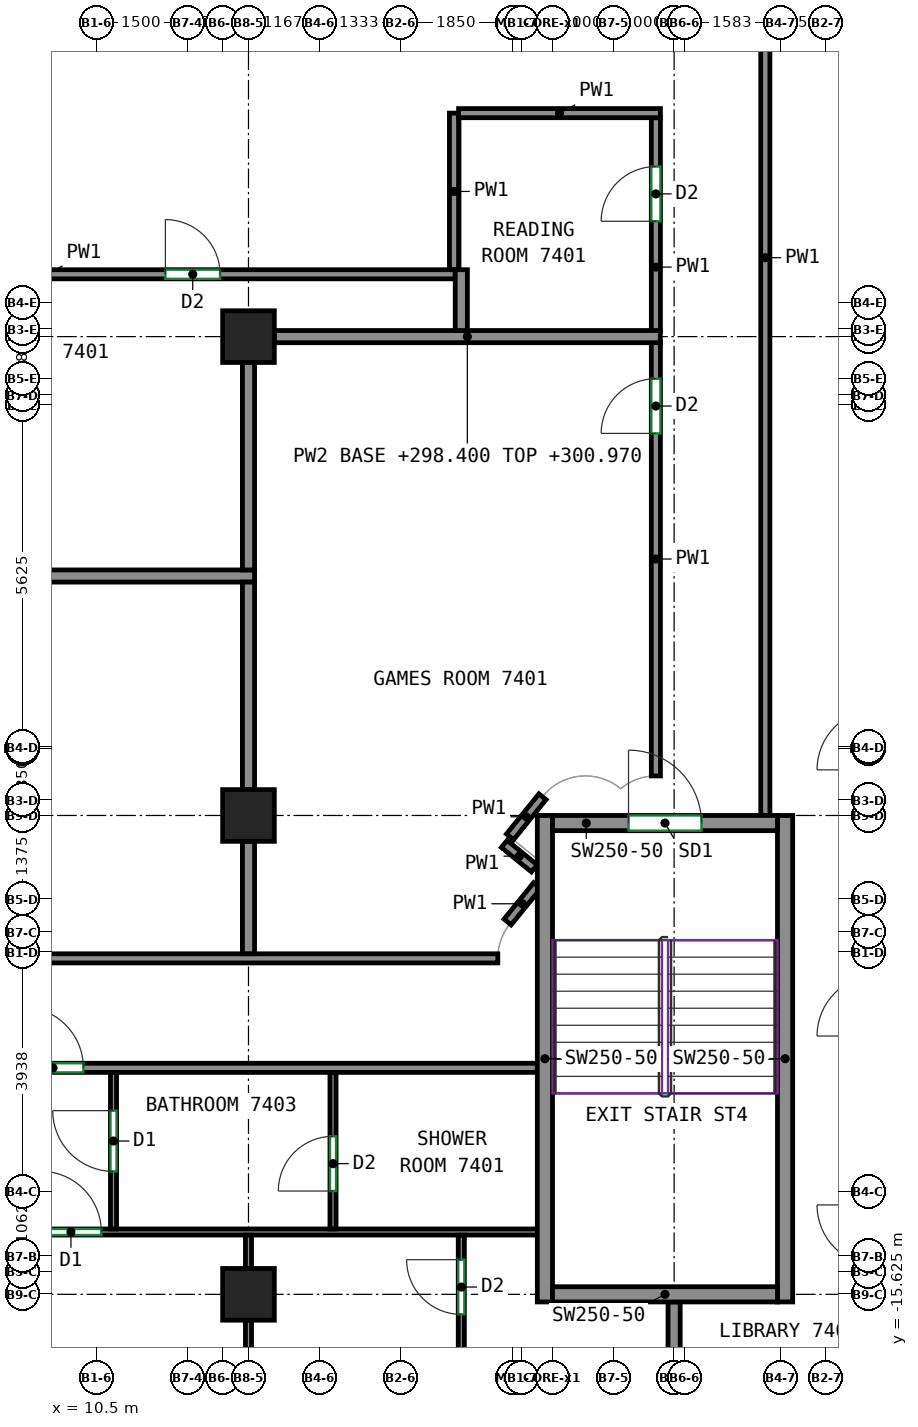
"""IFC4 building model, lengths in metres.
Left out: names, types, materials, properties, quantities, classifications, styles, units other than length and angle.
Written with IfcOpenShell. Run it as: python <this file> out.ifc"""

import sys

from ifc_helpers import new_model, si_unit, direction, frame, frame_2d, origin, origin_2d, place, context, subcontext, project, spatial, rectangle, extrude, source, transform, mapped, element, fill, save


model = new_model("IFC4")
c1 = context("Model", 3, precision=1e-05, world=origin(), true_north=direction((0.0, 1.0)))
c2 = subcontext(c1, "Body", "Model", "MODEL_VIEW")
j1 = project(units=[si_unit("LENGTHUNIT", "METRE"), si_unit("PLANEANGLEUNIT", "RADIAN")], contexts=[c1])
p1 = place(None, origin())
s1 = spatial("IfcSite", under=j1, at=p1, CompositionType="ELEMENT")
p2 = place(p1, origin())
s2 = spatial("IfcBuilding", under=s1, at=p2, CompositionType="ELEMENT")
p3 = place(p2, frame((0.0, 0.0, 298.4)))
s3 = spatial("IfcBuildingStorey", under=s2, at=p3, CompositionType="ELEMENT", Elevation=298.4)
m1 = source(origin(), c2, "Body", "SweptSolid", [
    extrude(rectangle(XDim=0.85, YDim=0.85, at=origin_2d()), origin(), (0.0, 0.0, 1.0), 3.12),
])
for number, where, z_axis, x_axis in (
    (1, (13.0, -15.625, 0.0), (0.0, 0.0, 1.0), (1.0, 0.0, 0.0)),
    (2, (13.0, -7.75, 0.0), (0.0, 0.0, 1.0), (1.0, 0.0, 0.0)),
    (3, (13.0, 0.125, 0.0), (0.0, 0.0, 1.0), (1.0, 0.0, 0.0)),
):
    element("IfcColumn", number, at=place(p3, frame(where, z_axis=z_axis, x_axis=x_axis)), inside=s3, PredefinedType="COLUMN", context=c2, shape_type="MappedRepresentation", body=[
        mapped(m1, transform((0.0, 0.0, 0.0))),
    ])
m2 = source(origin(), c2, "Body", "SweptSolid", [
    extrude(rectangle(XDim=8.0, YDim=0.25, at=frame_2d((4.0, 0.0))), origin(), (0.0, 0.0, 1.0), 3.12),
])
for number, where, z_axis, x_axis in (
    (4, (17.875, -15.75, 0.0), (0.0, 0.0, 1.0), (0.0, 1.0, 0.0)),
    (5, (21.825, -15.75, 0.0), (0.0, 0.0, 1.0), (0.0, 1.0, 0.0)),
):
    element("IfcWall", number, at=place(p3, frame(where, z_axis=z_axis, x_axis=x_axis)), inside=s3, PredefinedType="SHEAR", context=c2, shape_type="MappedRepresentation", body=[
        mapped(m2, transform((0.0, 0.0, 0.0))),
    ])
m3 = source(origin(), c2, "Body", "SweptSolid", [
    extrude(rectangle(XDim=3.7, YDim=0.25, at=frame_2d((1.85, 0.0))), origin(), (0.0, 0.0, 1.0), 3.12),
])
p4 = place(p3, frame((18.0, -15.625, 0.0), z_axis=(0.0, 0.0, 1.0), x_axis=(1.0, 0.0, 0.0)))
e6 = element("IfcWall", 6, at=p4, inside=s3, PredefinedType="SHEAR", context=c2, shape_type="MappedRepresentation", body=[
    mapped(m3, transform((0.0, 0.0, 0.0))),
])
p5 = place(p3, frame((18.0, -7.875, 0.0), z_axis=(0.0, 0.0, 1.0), x_axis=(1.0, 0.0, 0.0)))
e7 = element("IfcWall", 7, at=p5, inside=s3, PredefinedType="SHEAR", context=c2, shape_type="MappedRepresentation", body=[
    mapped(m3, transform((0.0, 0.0, 0.0))),
])
p6 = place(p5, frame((1.25, 0.0, 0.0)))
e8 = element("IfcOpeningElement", 8, at=p6, cuts=e7, PredefinedType="OPENING", context=c2, shape_type="SweptSolid", body=[
    extrude(rectangle(XDim=1.2, YDim=2.1, at=frame_2d((0.6, 1.05))), frame((0.0, 0.135, 0.0), z_axis=(0.0, -1.0, 0.0), x_axis=(1.0, 0.0, 0.0)), (0.0, 0.0, 1.0), 0.27),
])
p7 = place(p3, frame((-13.55, -11.9, 0.0), z_axis=(0.0, 0.0, 1.0), x_axis=(1.0, 0.0, 0.0)))
e9 = element("IfcWall", 9, at=p7, inside=s3, PredefinedType="PARTITIONING", context=c2, shape_type="SweptSolid", body=[
    extrude(rectangle(XDim=31.3, YDim=0.15, at=frame_2d((15.65, 0.0))), origin(), (0.0, 0.0, 1.0), 3.12),
])
p8 = place(p7, frame((3.747, 0.0, 0.0)))
e10 = element("IfcOpeningElement", 10, at=p8, cuts=e9, PredefinedType="OPENING", context=c2, shape_type="SweptSolid", body=[
    extrude(rectangle(XDim=1.0, YDim=2.1, at=frame_2d((0.5, 1.05))), frame((0.0, 0.085, 0.0), z_axis=(0.0, -1.0, 0.0), x_axis=(1.0, 0.0, 0.0)), (0.0, 0.0, 1.0), 0.17),
])
p9 = place(p7, frame((22.835, 0.0, 0.0)))
e11 = element("IfcOpeningElement", 11, at=p9, cuts=e9, PredefinedType="OPENING", context=c2, shape_type="SweptSolid", body=[
    extrude(rectangle(XDim=1.0, YDim=2.1, at=frame_2d((0.5, 1.05))), frame((0.0, 0.085, 0.0), z_axis=(0.0, -1.0, 0.0), x_axis=(1.0, 0.0, 0.0)), (0.0, 0.0, 1.0), 0.17),
])
p10 = place(p3, frame((21.5, -7.75, 0.0), z_axis=(0.0, 0.0, 1.0), x_axis=(0.0, 1.0, 0.0)))
e12 = element("IfcWall", 12, at=p10, inside=s3, PredefinedType="PARTITIONING", context=c2, shape_type="SweptSolid", body=[
    extrude(rectangle(XDim=30.575, YDim=0.15, at=frame_2d((15.288, 0.0))), origin(), (0.0, 0.0, 1.0), 3.12),
])
p11 = place(p10, frame((14.035, 0.0, 0.0)))
e13 = element("IfcOpeningElement", 13, at=p11, cuts=e12, PredefinedType="OPENING", context=c2, shape_type="SweptSolid", body=[
    extrude(rectangle(XDim=0.9, YDim=2.1, at=frame_2d((0.45, 1.05))), frame((0.0, 0.085, 0.0), z_axis=(0.0, -1.0, 0.0), x_axis=(1.0, 0.0, 0.0)), (0.0, 0.0, 1.0), 0.17),
])
p12 = place(p3, frame((-13.55, -10.1, 0.0), z_axis=(0.0, 0.0, 1.0), x_axis=(1.0, 0.0, 0.0)))
e14 = element("IfcWall", 14, at=p12, inside=s3, PredefinedType="PARTITIONING", context=c2, shape_type="SweptSolid", body=[
    extrude(rectangle(XDim=30.65, YDim=0.15, at=frame_2d((15.325, 0.0))), origin(), (0.0, 0.0, 1.0), 3.12),
])
p13 = place(p12, frame((10.25, 0.0, 0.0)))
e15 = element("IfcOpeningElement", 15, at=p13, cuts=e14, PredefinedType="OPENING", context=c2, shape_type="SweptSolid", body=[
    extrude(rectangle(XDim=0.9, YDim=2.1, at=frame_2d((0.45, 1.05))), frame((0.0, 0.085, 0.0), z_axis=(0.0, -1.0, 0.0), x_axis=(1.0, 0.0, 0.0)), (0.0, 0.0, 1.0), 0.17),
])
p14 = place(p12, frame((22.153, 0.0, 0.0)))
e16 = element("IfcOpeningElement", 16, at=p14, cuts=e14, PredefinedType="OPENING", context=c2, shape_type="SweptSolid", body=[
    extrude(rectangle(XDim=0.9, YDim=2.1, at=frame_2d((0.45, 1.05))), frame((0.0, 0.085, 0.0), z_axis=(0.0, -1.0, 0.0), x_axis=(1.0, 0.0, 0.0)), (0.0, 0.0, 1.0), 0.17),
])
p15 = place(p3, frame((16.38, 1.225, 0.0), z_axis=(0.0, 0.0, 1.0), x_axis=(0.0, 1.0, 0.0)))
e17 = element("IfcWall", 17, at=p15, inside=s3, PredefinedType="PARTITIONING", context=c2, shape_type="SweptSolid", body=[
    extrude(rectangle(XDim=2.575, YDim=0.15, at=frame_2d((1.288, 0.0))), origin(), (0.0, 0.0, 1.0), 3.12),
])
p16 = place(p3, frame((6.805, 1.15, 0.0), z_axis=(0.0, 0.0, 1.0), x_axis=(1.0, 0.0, 0.0)))
e18 = element("IfcWall", 18, at=p16, inside=s3, PredefinedType="PARTITIONING", context=c2, shape_type="SweptSolid", body=[
    extrude(rectangle(XDim=9.595, YDim=0.15, at=frame_2d((4.797, 0.0))), origin(), (0.0, 0.0, 1.0), 3.12),
])
p17 = place(p16, frame((4.828, 0.0, 0.0)))
e19 = element("IfcOpeningElement", 19, at=p17, cuts=e18, PredefinedType="OPENING", context=c2, shape_type="SweptSolid", body=[
    extrude(rectangle(XDim=0.9, YDim=2.1, at=frame_2d((0.45, 1.05))), frame((0.0, 0.085, 0.0), z_axis=(0.0, -1.0, 0.0), x_axis=(1.0, 0.0, 0.0)), (0.0, 0.0, 1.0), 0.17),
])
p18 = place(p3, frame((17.748, -8.902, 0.0), z_axis=(0.0, 0.0, 1.0), x_axis=(-0.630342797145, -0.776316918589, 0.0)))
e20 = element("IfcWall", 20, at=p18, inside=s3, PredefinedType="PARTITIONING", context=c2, shape_type="SweptSolid", body=[
    extrude(rectangle(XDim=0.773, YDim=0.15, at=frame_2d((0.386, 0.0))), origin(), (0.0, 0.0, 1.0), 3.12),
])
p19 = place(p3, frame((17.206, -8.218, 0.0), z_axis=(0.0, 0.0, 1.0), x_axis=(0.776102288291, -0.630607039376, 0.0)))
e21 = element("IfcWall", 21, at=p19, inside=s3, PredefinedType="PARTITIONING", context=c2, shape_type="SweptSolid", body=[
    extrude(rectangle(XDim=0.638, YDim=0.15, at=frame_2d((0.319, 0.0))), origin(), (0.0, 0.0, 1.0), 3.12),
])
p20 = place(p3, frame((17.835, -7.442, 0.0), z_axis=(0.0, 0.0, 1.0), x_axis=(-0.628859024249, -0.777519342281, 0.0)))
e22 = element("IfcWall", 22, at=p20, inside=s3, PredefinedType="PARTITIONING", context=c2, shape_type="SweptSolid", body=[
    extrude(rectangle(XDim=0.849, YDim=0.15, at=frame_2d((0.425, 0.0))), origin(), (0.0, 0.0, 1.0), 3.12),
])
p21 = place(p3, frame((19.7, -7.1, 0.0), z_axis=(0.0, 0.0, 1.0), x_axis=(0.0, 1.0, 0.0)))
e23 = element("IfcWall", 23, at=p21, inside=s3, PredefinedType="PARTITIONING", context=c2, shape_type="SweptSolid", body=[
    extrude(rectangle(XDim=7.135, YDim=0.15, at=frame_2d((3.567, 0.0))), origin(), (0.0, 0.0, 1.0), 3.12),
])
p22 = place(p21, frame((5.633, 0.0, 0.0)))
e24 = element("IfcOpeningElement", 24, at=p22, cuts=e23, PredefinedType="OPENING", context=c2, shape_type="SweptSolid", body=[
    extrude(rectangle(XDim=0.9, YDim=2.1, at=frame_2d((0.45, 1.05))), frame((0.0, 0.085, 0.0), z_axis=(0.0, -1.0, 0.0), x_axis=(1.0, 0.0, 0.0)), (0.0, 0.0, 1.0), 0.17),
])
p23 = place(p3, frame((19.7, 0.215, 0.0), z_axis=(0.0, 0.0, 1.0), x_axis=(0.0, 1.0, 0.0)))
e25 = element("IfcWall", 25, at=p23, inside=s3, PredefinedType="PARTITIONING", context=c2, shape_type="SweptSolid", body=[
    extrude(rectangle(XDim=3.51, YDim=0.15, at=frame_2d((1.755, 0.0))), origin(), (0.0, 0.0, 1.0), 3.12),
])
p24 = place(p23, frame((1.807, 0.0, 0.0)))
e26 = element("IfcOpeningElement", 26, at=p24, cuts=e25, PredefinedType="OPENING", context=c2, shape_type="SweptSolid", body=[
    extrude(rectangle(XDim=0.9, YDim=2.1, at=frame_2d((0.45, 1.05))), frame((0.0, 0.085, 0.0), z_axis=(0.0, -1.0, 0.0), x_axis=(1.0, 0.0, 0.0)), (0.0, 0.0, 1.0), 0.17),
])
p25 = place(p3, frame((16.455, 3.8, 0.0), z_axis=(0.0, 0.0, 1.0), x_axis=(1.0, 0.0, 0.0)))
e27 = element("IfcWall", 27, at=p25, inside=s3, PredefinedType="PARTITIONING", context=c2, shape_type="SweptSolid", body=[
    extrude(rectangle(XDim=3.32, YDim=0.15, at=frame_2d((1.66, 0.0))), origin(), (0.0, 0.0, 1.0), 3.12),
])
p26 = place(p3, frame((-13.55, -14.6, 0.0), z_axis=(0.0, 0.0, 1.0), x_axis=(1.0, 0.0, 0.0)))
e28 = element("IfcWall", 28, at=p26, inside=s3, PredefinedType="PARTITIONING", context=c2, shape_type="SweptSolid", body=[
    extrude(rectangle(XDim=31.3, YDim=0.1, at=frame_2d((15.65, 0.0))), origin(), (0.0, 0.0, 1.0), 3.12),
])
p27 = place(p26, frame((0.309, 0.0, 0.0)))
e29 = element("IfcOpeningElement", 29, at=p27, cuts=e28, PredefinedType="OPENING", context=c2, shape_type="SweptSolid", body=[
    extrude(rectangle(XDim=0.9, YDim=2.1, at=frame_2d((0.45, 1.05))), frame((0.0, 0.06, 0.0), z_axis=(0.0, -1.0, 0.0), x_axis=(1.0, 0.0, 0.0)), (0.0, 0.0, 1.0), 0.12),
])
p28 = place(p26, frame((4.103, 0.0, 0.0)))
e30 = element("IfcOpeningElement", 30, at=p28, cuts=e28, PredefinedType="OPENING", context=c2, shape_type="SweptSolid", body=[
    extrude(rectangle(XDim=1.0, YDim=2.1, at=frame_2d((0.5, 1.05))), frame((0.0, 0.06, 0.0), z_axis=(0.0, -1.0, 0.0), x_axis=(1.0, 0.0, 0.0)), (0.0, 0.0, 1.0), 0.12),
])
p29 = place(p26, frame((13.955, 0.0, 0.0)))
e31 = element("IfcOpeningElement", 31, at=p29, cuts=e28, PredefinedType="OPENING", context=c2, shape_type="SweptSolid", body=[
    extrude(rectangle(XDim=0.9, YDim=2.1, at=frame_2d((0.45, 1.05))), frame((0.0, 0.06, 0.0), z_axis=(0.0, -1.0, 0.0), x_axis=(1.0, 0.0, 0.0)), (0.0, 0.0, 1.0), 0.12),
])
p30 = place(p26, frame((17.453, 0.0, 0.0)))
e32 = element("IfcOpeningElement", 32, at=p30, cuts=e28, PredefinedType="OPENING", context=c2, shape_type="SweptSolid", body=[
    extrude(rectangle(XDim=1.0, YDim=2.1, at=frame_2d((0.5, 1.05))), frame((0.0, 0.06, 0.0), z_axis=(0.0, -1.0, 0.0), x_axis=(1.0, 0.0, 0.0)), (0.0, 0.0, 1.0), 0.12),
])
p31 = place(p26, frame((23.13, 0.0, 0.0)))
e33 = element("IfcOpeningElement", 33, at=p31, cuts=e28, PredefinedType="OPENING", context=c2, shape_type="SweptSolid", body=[
    extrude(rectangle(XDim=1.0, YDim=2.1, at=frame_2d((0.5, 1.05))), frame((0.0, 0.06, 0.0), z_axis=(0.0, -1.0, 0.0), x_axis=(1.0, 0.0, 0.0)), (0.0, 0.0, 1.0), 0.12),
])
p32 = place(p3, frame((10.78, -14.55, 0.0), z_axis=(0.0, 0.0, 1.0), x_axis=(0.0, 1.0, 0.0)))
e34 = element("IfcWall", 34, at=p32, inside=s3, PredefinedType="PARTITIONING", context=c2, shape_type="SweptSolid", body=[
    extrude(rectangle(XDim=2.573, YDim=0.1, at=frame_2d((1.287, 0.0))), origin(), (0.0, 0.0, 1.0), 3.12),
])
p33 = place(p32, frame((0.946, 0.0, 0.0)))
e35 = element("IfcOpeningElement", 35, at=p33, cuts=e34, PredefinedType="OPENING", context=c2, shape_type="SweptSolid", body=[
    extrude(rectangle(XDim=1.0, YDim=2.1, at=frame_2d((0.5, 1.05))), frame((0.0, 0.06, 0.0), z_axis=(0.0, -1.0, 0.0), x_axis=(1.0, 0.0, 0.0)), (0.0, 0.0, 1.0), 0.12),
])
p34 = place(p3, frame((14.39, -14.55, 0.0), z_axis=(0.0, 0.0, 1.0), x_axis=(0.0, 1.0, 0.0)))
e36 = element("IfcWall", 36, at=p34, inside=s3, PredefinedType="PARTITIONING", context=c2, shape_type="SweptSolid", body=[
    extrude(rectangle(XDim=2.573, YDim=0.1, at=frame_2d((1.287, 0.0))), origin(), (0.0, 0.0, 1.0), 3.12),
])
p35 = place(p34, frame((0.624, 0.0, 0.0)))
e37 = element("IfcOpeningElement", 37, at=p35, cuts=e36, PredefinedType="OPENING", context=c2, shape_type="SweptSolid", body=[
    extrude(rectangle(XDim=0.9, YDim=2.1, at=frame_2d((0.45, 1.05))), frame((0.0, 0.06, 0.0), z_axis=(0.0, -1.0, 0.0), x_axis=(1.0, 0.0, 0.0)), (0.0, 0.0, 1.0), 0.12),
])
p36 = place(p3, frame((13.0, -15.2, 0.0), z_axis=(0.0, 0.0, 1.0), x_axis=(0.0, 1.0, 0.0)))
e38 = element("IfcWall", 38, at=p36, inside=s3, PredefinedType="PARTITIONING", context=c2, shape_type="SweptSolid", body=[
    extrude(rectangle(XDim=0.548, YDim=0.1, at=frame_2d((0.274, 0.0))), origin(), (0.0, 0.0, 1.0), 3.12),
])
p37 = place(p3, frame((13.0, -22.75, 0.0), z_axis=(0.0, 0.0, 1.0), x_axis=(0.0, 1.0, 0.0)))
e39 = element("IfcWall", 39, at=p37, inside=s3, PredefinedType="PARTITIONING", context=c2, shape_type="SweptSolid", body=[
    extrude(rectangle(XDim=6.7, YDim=0.1, at=frame_2d((3.35, 0.0))), origin(), (0.0, 0.0, 1.0), 3.12),
])
p38 = place(p37, frame((4.377, 0.0, 0.0)))
e40 = element("IfcOpeningElement", 40, at=p38, cuts=e39, PredefinedType="OPENING", context=c2, shape_type="SweptSolid", body=[
    extrude(rectangle(XDim=0.9, YDim=2.1, at=frame_2d((0.45, 1.05))), frame((0.0, 0.06, 0.0), z_axis=(0.0, -1.0, 0.0), x_axis=(1.0, 0.0, 0.0)), (0.0, 0.0, 1.0), 0.12),
])
p39 = place(p3, frame((16.5, -19.91, 0.0), z_axis=(0.0, 0.0, 1.0), x_axis=(0.0, 1.0, 0.0)))
e41 = element("IfcWall", 41, at=p39, inside=s3, PredefinedType="PARTITIONING", context=c2, shape_type="SweptSolid", body=[
    extrude(rectangle(XDim=5.258, YDim=0.1, at=frame_2d((2.629, 0.0))), origin(), (0.0, 0.0, 1.0), 3.12),
])
p40 = place(p39, frame((3.955, 0.0, 0.0)))
e42 = element("IfcOpeningElement", 42, at=p40, cuts=e41, PredefinedType="OPENING", context=c2, shape_type="SweptSolid", body=[
    extrude(rectangle(XDim=0.9, YDim=2.1, at=frame_2d((0.45, 1.05))), frame((0.0, 0.06, 0.0), z_axis=(0.0, -1.0, 0.0), x_axis=(1.0, 0.0, 0.0)), (0.0, 0.0, 1.0), 0.12),
])
p41 = place(p3, frame((20.0, -19.9, 0.0), z_axis=(0.0, 0.0, 1.0), x_axis=(0.0, 1.0, 0.0)))
e43 = element("IfcWall", 43, at=p41, inside=s3, PredefinedType="PARTITIONING", context=c2, shape_type="SweptSolid", body=[
    extrude(rectangle(XDim=4.15, YDim=0.2, at=frame_2d((2.075, 0.0))), origin(), (0.0, 0.0, 1.0), 3.12),
])
p42 = place(p3, frame((-4.6, -3.812, 0.0), z_axis=(0.0, 0.0, 1.0), x_axis=(1.0, 0.0, 0.0)))
e44 = element("IfcWall", 44, at=p42, inside=s3, PredefinedType="PARTITIONING", context=c2, shape_type="SweptSolid", body=[
    extrude(rectangle(XDim=17.7, YDim=0.2, at=frame_2d((8.85, 0.0))), origin(), (0.0, 0.0, 1.0), 3.12),
])
p43 = place(p3, frame((13.0, -7.325, 0.0), z_axis=(0.0, 0.0, 1.0), x_axis=(0.0, 1.0, 0.0)))
e45 = element("IfcWall", 45, at=p43, inside=s3, PredefinedType="PARTITIONING", context=c2, shape_type="SweptSolid", body=[
    extrude(rectangle(XDim=3.413, YDim=0.2, at=frame_2d((1.707, 0.0))), origin(), (0.0, 0.0, 1.0), 3.12),
])
p44 = place(p3, frame((13.0, -10.023, 0.0), z_axis=(0.0, 0.0, 1.0), x_axis=(0.0, 1.0, 0.0)))
e46 = element("IfcWall", 46, at=p44, inside=s3, PredefinedType="PARTITIONING", context=c2, shape_type="SweptSolid", body=[
    extrude(rectangle(XDim=1.848, YDim=0.2, at=frame_2d((0.924, 0.0))), origin(), (0.0, 0.0, 1.0), 3.12),
])
p45 = place(p3, frame((13.425, 0.125, 0.0), z_axis=(0.0, 0.0, 1.0), x_axis=(1.0, 0.0, 0.0)))
e47 = element("IfcWall", 47, at=p45, inside=s3, PredefinedType="PARTITIONING", context=c2, shape_type="SweptSolid", body=[
    extrude(rectangle(XDim=6.348, YDim=0.2, at=frame_2d((3.174, 0.0))), origin(), (0.0, 0.0, 1.0), 2.57),
])
p46 = place(p3, frame((13.0, -3.712, 0.0), z_axis=(0.0, 0.0, 1.0), x_axis=(0.0, 1.0, 0.0)))
e48 = element("IfcWall", 48, at=p46, inside=s3, PredefinedType="PARTITIONING", context=c2, shape_type="SweptSolid", body=[
    extrude(rectangle(XDim=3.412, YDim=0.2, at=frame_2d((1.706, 0.0))), origin(), (0.0, 0.0, 1.0), 3.12),
])
p47 = place(p3, frame((16.5, 0.225, 0.0), z_axis=(0.0, 0.0, 1.0), x_axis=(0.0, 1.0, 0.0)))
e49 = element("IfcWall", 49, at=p47, inside=s3, PredefinedType="PARTITIONING", context=c2, shape_type="SweptSolid", body=[
    extrude(rectangle(XDim=1.0, YDim=0.2, at=frame_2d((0.5, 0.0))), origin(), (0.0, 0.0, 1.0), 3.12),
])
p48 = place(p6, origin())
e50 = element("IfcDoor", 50, at=p48, inside=s3, OperationType="DOUBLE_DOOR_SINGLE_SWING", PredefinedType="DOOR", context=c2, shape_type="SweptSolid", body=[
    extrude(rectangle(XDim=1.2, YDim=2.1, at=frame_2d((0.6, 1.05))), frame((0.0, 0.025, 0.0), z_axis=(0.0, -1.0, 0.0), x_axis=(1.0, 0.0, 0.0)), (0.0, 0.0, 1.0), 0.05),
])
fill(e8, e50)
p49 = place(p40, origin())
e51 = element("IfcDoor", 51, at=p49, inside=s3, OperationType="SINGLE_SWING_RIGHT", PredefinedType="DOOR", context=c2, shape_type="SweptSolid", body=[
    extrude(rectangle(XDim=0.9, YDim=2.1, at=frame_2d((0.45, 1.05))), frame((0.0, 0.025, 0.0), z_axis=(0.0, -1.0, 0.0), x_axis=(1.0, 0.0, 0.0)), (0.0, 0.0, 1.0), 0.05),
])
fill(e42, e51)
p50 = place(p31, origin())
e52 = element("IfcDoor", 52, at=p50, inside=s3, OperationType="SINGLE_SWING_LEFT", PredefinedType="DOOR", context=c2, shape_type="SweptSolid", body=[
    extrude(rectangle(XDim=1.0, YDim=2.1, at=frame_2d((0.5, 1.05))), frame((0.0, 0.025, 0.0), z_axis=(0.0, -1.0, 0.0), x_axis=(1.0, 0.0, 0.0)), (0.0, 0.0, 1.0), 0.05),
])
fill(e33, e52)
p51 = place(p35, origin())
e53 = element("IfcDoor", 53, at=p51, inside=s3, OperationType="SINGLE_SWING_LEFT", PredefinedType="DOOR", context=c2, shape_type="SweptSolid", body=[
    extrude(rectangle(XDim=0.9, YDim=2.1, at=frame_2d((0.45, 1.05))), frame((0.0, 0.025, 0.0), z_axis=(0.0, -1.0, 0.0), x_axis=(1.0, 0.0, 0.0)), (0.0, 0.0, 1.0), 0.05),
])
fill(e37, e53)
p52 = place(p33, origin())
e54 = element("IfcDoor", 54, at=p52, inside=s3, OperationType="SINGLE_SWING_RIGHT", PredefinedType="DOOR", context=c2, shape_type="SweptSolid", body=[
    extrude(rectangle(XDim=1.0, YDim=2.1, at=frame_2d((0.5, 1.05))), frame((0.0, 0.025, 0.0), z_axis=(0.0, -1.0, 0.0), x_axis=(1.0, 0.0, 0.0)), (0.0, 0.0, 1.0), 0.05),
])
fill(e35, e54)
p53 = place(p9, origin())
e55 = element("IfcDoor", 55, at=p53, inside=s3, OperationType="SINGLE_SWING_LEFT", PredefinedType="DOOR", context=c2, shape_type="SweptSolid", body=[
    extrude(rectangle(XDim=1.0, YDim=2.1, at=frame_2d((0.5, 1.05))), frame((0.0, 0.025, 0.0), z_axis=(0.0, -1.0, 0.0), x_axis=(1.0, 0.0, 0.0)), (0.0, 0.0, 1.0), 0.05),
])
fill(e11, e55)
p54 = place(p22, origin())
e56 = element("IfcDoor", 56, at=p54, inside=s3, OperationType="SINGLE_SWING_LEFT", PredefinedType="DOOR", context=c2, shape_type="SweptSolid", body=[
    extrude(rectangle(XDim=0.9, YDim=2.1, at=frame_2d((0.45, 1.05))), frame((0.0, 0.025, 0.0), z_axis=(0.0, -1.0, 0.0), x_axis=(1.0, 0.0, 0.0)), (0.0, 0.0, 1.0), 0.05),
])
fill(e24, e56)
p55 = place(p17, origin())
e57 = element("IfcDoor", 57, at=p55, inside=s3, OperationType="SINGLE_SWING_LEFT", PredefinedType="DOOR", context=c2, shape_type="SweptSolid", body=[
    extrude(rectangle(XDim=0.9, YDim=2.1, at=frame_2d((0.45, 1.05))), frame((0.0, 0.025, 0.0), z_axis=(0.0, -1.0, 0.0), x_axis=(1.0, 0.0, 0.0)), (0.0, 0.0, 1.0), 0.05),
])
fill(e19, e57)
p56 = place(p24, origin())
e58 = element("IfcDoor", 58, at=p56, inside=s3, OperationType="SINGLE_SWING_LEFT", PredefinedType="DOOR", context=c2, shape_type="SweptSolid", body=[
    extrude(rectangle(XDim=0.9, YDim=2.1, at=frame_2d((0.45, 1.05))), frame((0.0, 0.025, 0.0), z_axis=(0.0, -1.0, 0.0), x_axis=(1.0, 0.0, 0.0)), (0.0, 0.0, 1.0), 0.05),
])
fill(e26, e58)
save(model, sys.argv[1])
